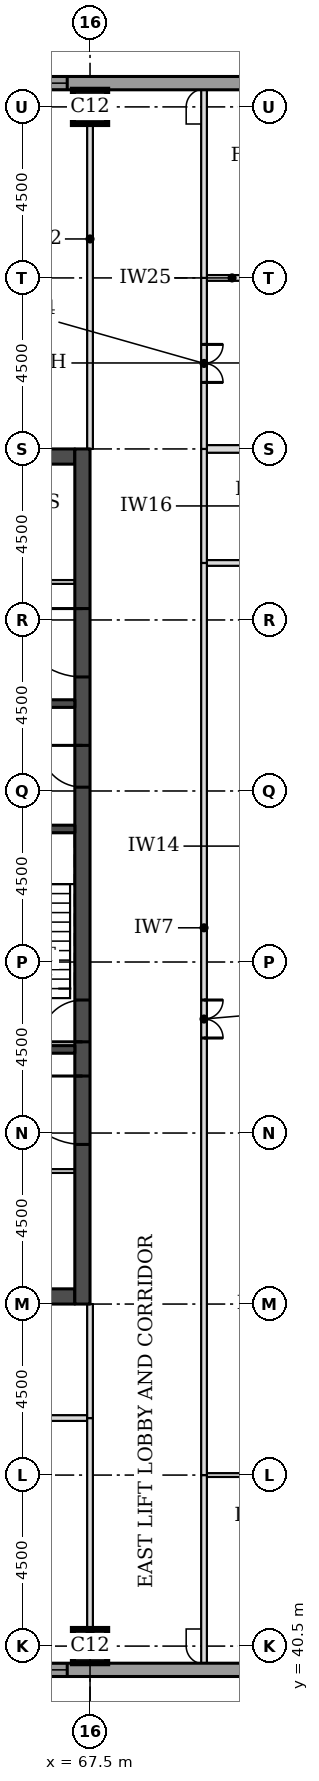
"""IFC4 building model, lengths in metres.
Left out: names, types, materials, properties, quantities, classifications, styles, units other than length and angle.
Written with IfcOpenShell. Run it as: python <this file> out.ifc"""

import sys

from ifc_helpers import new_model, si_unit, direction, frame, frame_2d, origin, origin_2d, place, context, subcontext, project, spatial, rectangle, extrude, element, fill, save


model = new_model("IFC4")
c1 = context("Model", 3, precision=1e-05, world=origin(), true_north=direction((0.0, 1.0)))
c2 = subcontext(c1, "Body", "Model", "MODEL_VIEW")
j1 = project(units=[si_unit("LENGTHUNIT", "METRE"), si_unit("PLANEANGLEUNIT", "RADIAN")], contexts=[c1])
p1 = place(None, origin())
s1 = spatial("IfcSite", under=j1, at=p1, CompositionType="ELEMENT")
p2 = place(p1, origin())
s2 = spatial("IfcBuilding", under=s1, at=p2, CompositionType="ELEMENT")
p3 = place(p2, frame((0.0, 0.0, 199.5)))
s3 = spatial("IfcBuildingStorey", under=s2, at=p3, CompositionType="ELEMENT", Elevation=199.5)
for number, where, z_axis, x_axis in (
    (1, (67.5, 40.5, 0.0), (0.0, 0.0, 1.0), (1.0, 0.0, 0.0)),
    (2, (67.5, 81.0, 0.0), (0.0, 0.0, 1.0), (1.0, 0.0, 0.0)),
):
    element("IfcColumn", number, at=place(p3, frame(where, z_axis=z_axis, x_axis=x_axis)), inside=s3, PredefinedType="COLUMN", context=c2, shape_type="SweptSolid", body=[
        extrude(rectangle(XDim=0.9, YDim=0.9, at=origin_2d()), origin(), (0.0, 0.0, 1.0), 3.7),
    ])
for number, where, z_axis, x_axis in (
    (3, (45.4, 49.7, 0.0), (0.0, 0.0, 1.0), (1.0, 0.0, 0.0)),
    (4, (45.4, 71.8, 0.0), (0.0, 0.0, 1.0), (1.0, 0.0, 0.0)),
):
    element("IfcWall", number, at=place(p3, frame(where, z_axis=z_axis, x_axis=x_axis)), inside=s3, PredefinedType="SHEAR", context=c2, shape_type="SweptSolid", body=[
        extrude(rectangle(XDim=21.7, YDim=0.4, at=frame_2d((10.85, 0.0))), origin(), (0.0, 0.0, 1.0), 3.7),
    ])
p4 = place(p3, frame((67.3, 49.5, 0.0), z_axis=(0.0, 0.0, 1.0), x_axis=(0.0, 1.0, 0.0)))
e5 = element("IfcWall", 5, at=p4, inside=s3, PredefinedType="SHEAR", context=c2, shape_type="SweptSolid", body=[
    extrude(rectangle(XDim=22.5, YDim=0.4, at=frame_2d((11.25, 0.0))), origin(), (0.0, 0.0, 1.0), 3.7),
])
p5 = place(p4, frame((4.2, 0.0, 0.0)))
e6 = element("IfcOpeningElement", 6, at=p5, cuts=e5, PredefinedType="OPENING", context=c2, shape_type="SweptSolid", body=[
    extrude(rectangle(XDim=1.8, YDim=2.1, at=frame_2d((0.9, 1.05))), frame((0.0, 0.21, 0.0), z_axis=(0.0, -1.0, 0.0), x_axis=(1.0, 0.0, 0.0)), (0.0, 0.0, 1.0), 0.42),
])
p6 = place(p4, frame((6.9, 0.0, 0.0)))
e7 = element("IfcOpeningElement", 7, at=p6, cuts=e5, PredefinedType="OPENING", context=c2, shape_type="SweptSolid", body=[
    extrude(rectangle(XDim=1.1, YDim=2.1, at=frame_2d((0.55, 1.05))), frame((0.0, 0.21, 0.0), z_axis=(0.0, -1.0, 0.0), x_axis=(1.0, 0.0, 0.0)), (0.0, 0.0, 1.0), 0.42),
])
p7 = place(p4, frame((13.6, 0.0, 0.0)))
e8 = element("IfcOpeningElement", 8, at=p7, cuts=e5, PredefinedType="OPENING", context=c2, shape_type="SweptSolid", body=[
    extrude(rectangle(XDim=1.1, YDim=2.1, at=frame_2d((0.55, 1.05))), frame((0.0, 0.21, 0.0), z_axis=(0.0, -1.0, 0.0), x_axis=(1.0, 0.0, 0.0)), (0.0, 0.0, 1.0), 0.42),
])
p8 = place(p4, frame((16.5, 0.0, 0.0)))
e9 = element("IfcOpeningElement", 9, at=p8, cuts=e5, PredefinedType="OPENING", context=c2, shape_type="SweptSolid", body=[
    extrude(rectangle(XDim=1.8, YDim=2.1, at=frame_2d((0.9, 1.05))), frame((0.0, 0.21, 0.0), z_axis=(0.0, -1.0, 0.0), x_axis=(1.0, 0.0, 0.0)), (0.0, 0.0, 1.0), 0.42),
])
p9 = place(p3, frame((36.0, 39.875, 0.0), z_axis=(0.0, 0.0, 1.0), x_axis=(1.0, 0.0, 0.0)))
e10 = element("IfcWall", 10, at=p9, inside=s3, PredefinedType="STANDARD", context=c2, shape_type="SweptSolid", body=[
    extrude(rectangle(XDim=36.331, YDim=0.35, at=frame_2d((18.166, 0.0))), origin(), (0.0, 0.0, 1.0), 3.525),
])
p10 = place(p9, frame((5.1, 0.0, 0.9)))
e11 = element("IfcOpeningElement", 11, at=p10, cuts=e10, PredefinedType="OPENING", context=c2, shape_type="SweptSolid", body=[
    extrude(rectangle(XDim=3.3, YDim=1.9, at=frame_2d((1.65, 0.95))), frame((0.0, 0.185, 0.0), z_axis=(0.0, -1.0, 0.0), x_axis=(1.0, 0.0, 0.0)), (0.0, 0.0, 1.0), 0.37),
])
p11 = place(p9, frame((9.6, 0.0, 0.9)))
e12 = element("IfcOpeningElement", 12, at=p11, cuts=e10, PredefinedType="OPENING", context=c2, shape_type="SweptSolid", body=[
    extrude(rectangle(XDim=3.3, YDim=1.9, at=frame_2d((1.65, 0.95))), frame((0.0, 0.185, 0.0), z_axis=(0.0, -1.0, 0.0), x_axis=(1.0, 0.0, 0.0)), (0.0, 0.0, 1.0), 0.37),
])
p12 = place(p9, frame((14.1, 0.0, 0.9)))
e13 = element("IfcOpeningElement", 13, at=p12, cuts=e10, PredefinedType="OPENING", context=c2, shape_type="SweptSolid", body=[
    extrude(rectangle(XDim=3.3, YDim=1.9, at=frame_2d((1.65, 0.95))), frame((0.0, 0.185, 0.0), z_axis=(0.0, -1.0, 0.0), x_axis=(1.0, 0.0, 0.0)), (0.0, 0.0, 1.0), 0.37),
])
p13 = place(p9, frame((18.6, 0.0, 0.9)))
e14 = element("IfcOpeningElement", 14, at=p13, cuts=e10, PredefinedType="OPENING", context=c2, shape_type="SweptSolid", body=[
    extrude(rectangle(XDim=3.3, YDim=1.9, at=frame_2d((1.65, 0.95))), frame((0.0, 0.185, 0.0), z_axis=(0.0, -1.0, 0.0), x_axis=(1.0, 0.0, 0.0)), (0.0, 0.0, 1.0), 0.37),
])
p14 = place(p9, frame((23.1, 0.0, 0.9)))
e15 = element("IfcOpeningElement", 15, at=p14, cuts=e10, PredefinedType="OPENING", context=c2, shape_type="SweptSolid", body=[
    extrude(rectangle(XDim=3.3, YDim=1.9, at=frame_2d((1.65, 0.95))), frame((0.0, 0.185, 0.0), z_axis=(0.0, -1.0, 0.0), x_axis=(1.0, 0.0, 0.0)), (0.0, 0.0, 1.0), 0.37),
])
p15 = place(p9, frame((27.6, 0.0, 0.9)))
e16 = element("IfcOpeningElement", 16, at=p15, cuts=e10, PredefinedType="OPENING", context=c2, shape_type="SweptSolid", body=[
    extrude(rectangle(XDim=3.3, YDim=1.9, at=frame_2d((1.65, 0.95))), frame((0.0, 0.185, 0.0), z_axis=(0.0, -1.0, 0.0), x_axis=(1.0, 0.0, 0.0)), (0.0, 0.0, 1.0), 0.37),
])
p16 = place(p3, frame((72.331, 81.625, 0.0), z_axis=(0.0, 0.0, 1.0), x_axis=(-1.0, 0.0, 0.0)))
e17 = element("IfcWall", 17, at=p16, inside=s3, PredefinedType="STANDARD", context=c2, shape_type="SweptSolid", body=[
    extrude(rectangle(XDim=32.163, YDim=0.35, at=frame_2d((16.081, 0.0))), origin(), (0.0, 0.0, 1.0), 3.525),
])
p17 = place(p16, frame((5.431, 0.0, 0.9)))
e18 = element("IfcOpeningElement", 18, at=p17, cuts=e17, PredefinedType="OPENING", context=c2, shape_type="SweptSolid", body=[
    extrude(rectangle(XDim=3.3, YDim=1.9, at=frame_2d((1.65, 0.95))), frame((0.0, 0.185, 0.0), z_axis=(0.0, -1.0, 0.0), x_axis=(1.0, 0.0, 0.0)), (0.0, 0.0, 1.0), 0.37),
])
p18 = place(p16, frame((9.931, 0.0, 0.9)))
e19 = element("IfcOpeningElement", 19, at=p18, cuts=e17, PredefinedType="OPENING", context=c2, shape_type="SweptSolid", body=[
    extrude(rectangle(XDim=3.3, YDim=1.9, at=frame_2d((1.65, 0.95))), frame((0.0, 0.185, 0.0), z_axis=(0.0, -1.0, 0.0), x_axis=(1.0, 0.0, 0.0)), (0.0, 0.0, 1.0), 0.37),
])
p19 = place(p16, frame((14.431, 0.0, 0.9)))
e20 = element("IfcOpeningElement", 20, at=p19, cuts=e17, PredefinedType="OPENING", context=c2, shape_type="SweptSolid", body=[
    extrude(rectangle(XDim=3.3, YDim=1.9, at=frame_2d((1.65, 0.95))), frame((0.0, 0.185, 0.0), z_axis=(0.0, -1.0, 0.0), x_axis=(1.0, 0.0, 0.0)), (0.0, 0.0, 1.0), 0.37),
])
p20 = place(p16, frame((18.931, 0.0, 0.9)))
e21 = element("IfcOpeningElement", 21, at=p20, cuts=e17, PredefinedType="OPENING", context=c2, shape_type="SweptSolid", body=[
    extrude(rectangle(XDim=3.3, YDim=1.9, at=frame_2d((1.65, 0.95))), frame((0.0, 0.185, 0.0), z_axis=(0.0, -1.0, 0.0), x_axis=(1.0, 0.0, 0.0)), (0.0, 0.0, 1.0), 0.37),
])
p21 = place(p16, frame((23.431, 0.0, 0.9)))
e22 = element("IfcOpeningElement", 22, at=p21, cuts=e17, PredefinedType="OPENING", context=c2, shape_type="SweptSolid", body=[
    extrude(rectangle(XDim=3.3, YDim=1.9, at=frame_2d((1.65, 0.95))), frame((0.0, 0.185, 0.0), z_axis=(0.0, -1.0, 0.0), x_axis=(1.0, 0.0, 0.0)), (0.0, 0.0, 1.0), 0.37),
])
p22 = place(p3, frame((70.575, 45.0, 0.0), z_axis=(0.0, 0.0, 1.0), x_axis=(1.0, 0.0, 0.0)))
e23 = element("IfcWall", 23, at=p22, inside=s3, PredefinedType="PARTITIONING", context=c2, shape_type="SweptSolid", body=[
    extrude(rectangle(XDim=2.925, YDim=0.1, at=frame_2d((1.462, 0.0))), origin(), (0.0, 0.0, 1.0), 3.096),
])
p23 = place(p22, frame((1.0, 0.0, 0.0)))
e24 = element("IfcOpeningElement", 24, at=p23, cuts=e23, PredefinedType="OPENING", context=c2, shape_type="SweptSolid", body=[
    extrude(rectangle(XDim=0.9, YDim=2.1, at=frame_2d((0.45, 1.05))), frame((0.0, 0.06, 0.0), z_axis=(0.0, -1.0, 0.0), x_axis=(1.0, 0.0, 0.0)), (0.0, 0.0, 1.0), 0.12),
])
p24 = place(p3, frame((63.0, 46.5, 0.0), z_axis=(0.0, 0.0, 1.0), x_axis=(1.0, 0.0, 0.0)))
e25 = element("IfcWall", 25, at=p24, inside=s3, PredefinedType="PARTITIONING", context=c2, shape_type="SweptSolid", body=[
    extrude(rectangle(XDim=4.425, YDim=0.15, at=frame_2d((2.212, 0.0))), origin(), (0.0, 0.0, 1.0), 3.55),
])
p25 = place(p24, frame((1.75, 0.0, 0.0)))
e26 = element("IfcOpeningElement", 26, at=p25, cuts=e25, PredefinedType="OPENING", context=c2, shape_type="SweptSolid", body=[
    extrude(rectangle(XDim=0.9, YDim=2.1, at=frame_2d((0.45, 1.05))), frame((0.0, 0.085, 0.0), z_axis=(0.0, -1.0, 0.0), x_axis=(1.0, 0.0, 0.0)), (0.0, 0.0, 1.0), 0.17),
])
p26 = place(p3, frame((70.575, 69.0, 0.0), z_axis=(0.0, 0.0, 1.0), x_axis=(1.0, 0.0, 0.0)))
e27 = element("IfcWall", 27, at=p26, inside=s3, PredefinedType="PARTITIONING", context=c2, shape_type="SweptSolid", body=[
    extrude(rectangle(XDim=2.85, YDim=0.15, at=frame_2d((1.425, 0.0))), origin(), (0.0, 0.0, 1.0), 3.55),
])
p27 = place(p26, frame((0.95, 0.0, 0.0)))
e28 = element("IfcOpeningElement", 28, at=p27, cuts=e27, PredefinedType="OPENING", context=c2, shape_type="SweptSolid", body=[
    extrude(rectangle(XDim=0.9, YDim=2.1, at=frame_2d((0.45, 1.05))), frame((0.0, 0.085, 0.0), z_axis=(0.0, -1.0, 0.0), x_axis=(1.0, 0.0, 0.0)), (0.0, 0.0, 1.0), 0.17),
])
p28 = place(p3, frame((70.575, 72.0, 0.0), z_axis=(0.0, 0.0, 1.0), x_axis=(1.0, 0.0, 0.0)))
e29 = element("IfcWall", 29, at=p28, inside=s3, PredefinedType="PARTITIONING", context=c2, shape_type="SweptSolid", body=[
    extrude(rectangle(XDim=2.85, YDim=0.2, at=frame_2d((1.425, 0.0))), origin(), (0.0, 0.0, 1.0), 3.55),
])
p29 = place(p3, frame((70.575, 76.5, 0.0), z_axis=(0.0, 0.0, 1.0), x_axis=(1.0, 0.0, 0.0)))
e30 = element("IfcWall", 30, at=p29, inside=s3, PredefinedType="PARTITIONING", context=c2, shape_type="SweptSolid", body=[
    extrude(rectangle(XDim=2.925, YDim=0.15, at=frame_2d((1.462, 0.0))), origin(), (0.0, 0.0, 1.0), 3.096),
])
p30 = place(p29, frame((1.0, 0.0, 0.0)))
e31 = element("IfcOpeningElement", 31, at=p30, cuts=e30, PredefinedType="OPENING", context=c2, shape_type="SweptSolid", body=[
    extrude(rectangle(XDim=0.9, YDim=2.1, at=frame_2d((0.45, 1.05))), frame((0.0, 0.085, 0.0), z_axis=(0.0, -1.0, 0.0), x_axis=(1.0, 0.0, 0.0)), (0.0, 0.0, 1.0), 0.17),
])
p31 = place(p3, frame((67.5, 40.05, 0.0), z_axis=(0.0, 0.0, 1.0), x_axis=(0.0, 1.0, 0.0)))
e32 = element("IfcWall", 32, at=p31, inside=s3, PredefinedType="PARTITIONING", context=c2, shape_type="SweptSolid", body=[
    extrude(rectangle(XDim=6.45, YDim=0.15, at=frame_2d((3.225, 0.0))), origin(), (0.0, 0.0, 1.0), 3.022),
])
p32 = place(p3, frame((70.5, 40.05, 0.0), z_axis=(0.0, 0.0, 1.0), x_axis=(0.0, 1.0, 0.0)))
e33 = element("IfcWall", 33, at=p32, inside=s3, PredefinedType="PARTITIONING", context=c2, shape_type="SweptSolid", body=[
    extrude(rectangle(XDim=4.95, YDim=0.15, at=frame_2d((2.475, 0.0))), origin(), (0.0, 0.0, 1.0), 3.55),
])
p33 = place(p3, frame((70.5, 45.0, 0.0), z_axis=(0.0, 0.0, 1.0), x_axis=(0.0, 1.0, 0.0)))
e34 = element("IfcWall", 34, at=p33, inside=s3, PredefinedType="PARTITIONING", context=c2, shape_type="SweptSolid", body=[
    extrude(rectangle(XDim=24.0, YDim=0.15, at=frame_2d((12.0, 0.0))), origin(), (0.0, 0.0, 1.0), 3.55),
])
p34 = place(p33, frame((11.5, 0.0, 0.0)))
e35 = element("IfcOpeningElement", 35, at=p34, cuts=e34, PredefinedType="OPENING", context=c2, shape_type="SweptSolid", body=[
    extrude(rectangle(XDim=1.0, YDim=2.1, at=frame_2d((0.5, 1.05))), frame((0.0, 0.085, 0.0), z_axis=(0.0, -1.0, 0.0), x_axis=(1.0, 0.0, 0.0)), (0.0, 0.0, 1.0), 0.17),
])
p35 = place(p3, frame((67.5, 46.5, 0.0), z_axis=(0.0, 0.0, 1.0), x_axis=(0.0, 1.0, 0.0)))
e36 = element("IfcWall", 36, at=p35, inside=s3, PredefinedType="PARTITIONING", context=c2, shape_type="SweptSolid", body=[
    extrude(rectangle(XDim=3.0, YDim=0.15, at=frame_2d((1.5, 0.0))), origin(), (0.0, 0.0, 1.0), 3.022),
])
p36 = place(p3, frame((70.5, 69.0, 0.0), z_axis=(0.0, 0.0, 1.0), x_axis=(0.0, 1.0, 0.0)))
e37 = element("IfcWall", 37, at=p36, inside=s3, PredefinedType="PARTITIONING", context=c2, shape_type="SweptSolid", body=[
    extrude(rectangle(XDim=3.0, YDim=0.15, at=frame_2d((1.5, 0.0))), origin(), (0.0, 0.0, 1.0), 3.55),
])
p37 = place(p3, frame((67.5, 72.0, 0.0), z_axis=(0.0, 0.0, 1.0), x_axis=(0.0, 1.0, 0.0)))
e38 = element("IfcWall", 38, at=p37, inside=s3, PredefinedType="PARTITIONING", context=c2, shape_type="SweptSolid", body=[
    extrude(rectangle(XDim=9.45, YDim=0.15, at=frame_2d((4.725, 0.0))), origin(), (0.0, 0.0, 1.0), 3.022),
])
p38 = place(p3, frame((70.5, 72.0, 0.0), z_axis=(0.0, 0.0, 1.0), x_axis=(0.0, 1.0, 0.0)))
e39 = element("IfcWall", 39, at=p38, inside=s3, PredefinedType="PARTITIONING", context=c2, shape_type="SweptSolid", body=[
    extrude(rectangle(XDim=4.5, YDim=0.15, at=frame_2d((2.25, 0.0))), origin(), (0.0, 0.0, 1.0), 3.55),
])
p39 = place(p38, frame((1.75, 0.0, 0.0)))
e40 = element("IfcOpeningElement", 40, at=p39, cuts=e39, PredefinedType="OPENING", context=c2, shape_type="SweptSolid", body=[
    extrude(rectangle(XDim=1.0, YDim=2.1, at=frame_2d((0.5, 1.05))), frame((0.0, 0.085, 0.0), z_axis=(0.0, -1.0, 0.0), x_axis=(1.0, 0.0, 0.0)), (0.0, 0.0, 1.0), 0.17),
])
p40 = place(p3, frame((70.5, 76.5, 0.0), z_axis=(0.0, 0.0, 1.0), x_axis=(0.0, 1.0, 0.0)))
e41 = element("IfcWall", 41, at=p40, inside=s3, PredefinedType="PARTITIONING", context=c2, shape_type="SweptSolid", body=[
    extrude(rectangle(XDim=4.95, YDim=0.15, at=frame_2d((2.475, 0.0))), origin(), (0.0, 0.0, 1.0), 3.55),
])
p41 = place(p3, frame((45.4, 53.0, 0.0), z_axis=(0.0, 0.0, 1.0), x_axis=(1.0, 0.0, 0.0)))
e42 = element("IfcWall", 42, at=p41, inside=s3, PredefinedType="PARTITIONING", context=c2, shape_type="SweptSolid", body=[
    extrude(rectangle(XDim=21.7, YDim=0.1, at=frame_2d((10.85, 0.0))), origin(), (0.0, 0.0, 1.0), 3.55),
])
p42 = place(p41, frame((20.019, 0.0, 0.0)))
e43 = element("IfcOpeningElement", 43, at=p42, cuts=e42, PredefinedType="OPENING", context=c2, shape_type="SweptSolid", body=[
    extrude(rectangle(XDim=1.0, YDim=2.1, at=frame_2d((0.5, 1.05))), frame((0.0, 0.06, 0.0), z_axis=(0.0, -1.0, 0.0), x_axis=(1.0, 0.0, 0.0)), (0.0, 0.0, 1.0), 0.12),
])
p43 = place(p41, frame((17.444, 0.0, 0.0)))
e44 = element("IfcOpeningElement", 44, at=p43, cuts=e42, PredefinedType="OPENING", context=c2, shape_type="SweptSolid", body=[
    extrude(rectangle(XDim=0.9, YDim=2.1, at=frame_2d((0.45, 1.05))), frame((0.0, 0.06, 0.0), z_axis=(0.0, -1.0, 0.0), x_axis=(1.0, 0.0, 0.0)), (0.0, 0.0, 1.0), 0.12),
])
p44 = place(p41, frame((0.863, 0.0, 0.0)))
e45 = element("IfcOpeningElement", 45, at=p44, cuts=e42, PredefinedType="OPENING", context=c2, shape_type="SweptSolid", body=[
    extrude(rectangle(XDim=0.9, YDim=2.1, at=frame_2d((0.45, 1.05))), frame((0.0, 0.06, 0.0), z_axis=(0.0, -1.0, 0.0), x_axis=(1.0, 0.0, 0.0)), (0.0, 0.0, 1.0), 0.12),
])
p45 = place(p41, frame((3.488, 0.0, 0.0)))
e46 = element("IfcOpeningElement", 46, at=p45, cuts=e42, PredefinedType="OPENING", context=c2, shape_type="SweptSolid", body=[
    extrude(rectangle(XDim=0.9, YDim=2.1, at=frame_2d((0.45, 1.05))), frame((0.0, 0.06, 0.0), z_axis=(0.0, -1.0, 0.0), x_axis=(1.0, 0.0, 0.0)), (0.0, 0.0, 1.0), 0.12),
])
p46 = place(p41, frame((6.816, 0.0, 0.0)))
e47 = element("IfcOpeningElement", 47, at=p46, cuts=e42, PredefinedType="OPENING", context=c2, shape_type="SweptSolid", body=[
    extrude(rectangle(XDim=0.9, YDim=2.1, at=frame_2d((0.45, 1.05))), frame((0.0, 0.06, 0.0), z_axis=(0.0, -1.0, 0.0), x_axis=(1.0, 0.0, 0.0)), (0.0, 0.0, 1.0), 0.12),
])
p47 = place(p41, frame((12.416, 0.0, 0.0)))
e48 = element("IfcOpeningElement", 48, at=p47, cuts=e42, PredefinedType="OPENING", context=c2, shape_type="SweptSolid", body=[
    extrude(rectangle(XDim=0.9, YDim=2.1, at=frame_2d((0.45, 1.05))), frame((0.0, 0.06, 0.0), z_axis=(0.0, -1.0, 0.0), x_axis=(1.0, 0.0, 0.0)), (0.0, 0.0, 1.0), 0.12),
])
p48 = place(p3, frame((63.9, 56.2, 0.0), z_axis=(0.0, 0.0, 1.0), x_axis=(1.0, 0.0, 0.0)))
e49 = element("IfcWall", 49, at=p48, inside=s3, PredefinedType="SOLIDWALL", context=c2, shape_type="SweptSolid", body=[
    extrude(rectangle(XDim=3.2, YDim=0.2, at=frame_2d((1.6, 0.0))), origin(), (0.0, 0.0, 1.0), 3.55),
])
p49 = place(p3, frame((61.85, 62.0, 0.0), z_axis=(0.0, 0.0, 1.0), x_axis=(1.0, 0.0, 0.0)))
e50 = element("IfcWall", 50, at=p49, inside=s3, PredefinedType="SOLIDWALL", context=c2, shape_type="SweptSolid", body=[
    extrude(rectangle(XDim=5.25, YDim=0.2, at=frame_2d((2.625, 0.0))), origin(), (0.0, 0.0, 1.0), 3.55),
])
p50 = place(p3, frame((64.7, 65.3, 0.0), z_axis=(0.0, 0.0, 1.0), x_axis=(1.0, 0.0, 0.0)))
e51 = element("IfcWall", 51, at=p50, inside=s3, PredefinedType="SOLIDWALL", context=c2, shape_type="SweptSolid", body=[
    extrude(rectangle(XDim=2.4, YDim=0.2, at=frame_2d((1.2, 0.0))), origin(), (0.0, 0.0, 1.0), 3.55),
])
p51 = place(p3, frame((45.4, 68.5, 0.0), z_axis=(0.0, 0.0, 1.0), x_axis=(1.0, 0.0, 0.0)))
e52 = element("IfcWall", 52, at=p51, inside=s3, PredefinedType="PARTITIONING", context=c2, shape_type="SweptSolid", body=[
    extrude(rectangle(XDim=21.7, YDim=0.1, at=frame_2d((10.85, 0.0))), origin(), (0.0, 0.0, 1.0), 3.55),
])
p52 = place(p51, frame((19.806, 0.0, 0.0)))
e53 = element("IfcOpeningElement", 53, at=p52, cuts=e52, PredefinedType="OPENING", context=c2, shape_type="SweptSolid", body=[
    extrude(rectangle(XDim=0.9, YDim=2.1, at=frame_2d((0.45, 1.05))), frame((0.0, 0.06, 0.0), z_axis=(0.0, -1.0, 0.0), x_axis=(1.0, 0.0, 0.0)), (0.0, 0.0, 1.0), 0.12),
])
p53 = place(p51, frame((17.181, 0.0, 0.0)))
e54 = element("IfcOpeningElement", 54, at=p53, cuts=e52, PredefinedType="OPENING", context=c2, shape_type="SweptSolid", body=[
    extrude(rectangle(XDim=0.9, YDim=2.1, at=frame_2d((0.45, 1.05))), frame((0.0, 0.06, 0.0), z_axis=(0.0, -1.0, 0.0), x_axis=(1.0, 0.0, 0.0)), (0.0, 0.0, 1.0), 0.12),
])
p54 = place(p51, frame((2.175, 0.0, 0.0)))
e55 = element("IfcOpeningElement", 55, at=p54, cuts=e52, PredefinedType="OPENING", context=c2, shape_type="SweptSolid", body=[
    extrude(rectangle(XDim=0.9, YDim=2.1, at=frame_2d((0.45, 1.05))), frame((0.0, 0.06, 0.0), z_axis=(0.0, -1.0, 0.0), x_axis=(1.0, 0.0, 0.0)), (0.0, 0.0, 1.0), 0.12),
])
p55 = place(p51, frame((13.984, 0.0, 0.0)))
e56 = element("IfcOpeningElement", 56, at=p55, cuts=e52, PredefinedType="OPENING", context=c2, shape_type="SweptSolid", body=[
    extrude(rectangle(XDim=0.9, YDim=2.1, at=frame_2d((0.45, 1.05))), frame((0.0, 0.06, 0.0), z_axis=(0.0, -1.0, 0.0), x_axis=(1.0, 0.0, 0.0)), (0.0, 0.0, 1.0), 0.12),
])
p56 = place(p51, frame((8.384, 0.0, 0.0)))
e57 = element("IfcOpeningElement", 57, at=p56, cuts=e52, PredefinedType="OPENING", context=c2, shape_type="SweptSolid", body=[
    extrude(rectangle(XDim=0.9, YDim=2.1, at=frame_2d((0.45, 1.05))), frame((0.0, 0.06, 0.0), z_axis=(0.0, -1.0, 0.0), x_axis=(1.0, 0.0, 0.0)), (0.0, 0.0, 1.0), 0.12),
])
p57 = place(p15, origin())
e58 = element("IfcWindow", 58, at=p57, inside=s3, PartitioningType="SINGLE_PANEL", PredefinedType="WINDOW", context=c2, shape_type="SweptSolid", body=[
    extrude(rectangle(XDim=3.3, YDim=1.9, at=frame_2d((1.65, 0.95))), frame((0.0, 0.085, 0.0), z_axis=(0.0, -1.0, 0.0), x_axis=(1.0, 0.0, 0.0)), (0.0, 0.0, 1.0), 0.06),
])
fill(e16, e58)
p58 = place(p17, origin())
e59 = element("IfcWindow", 59, at=p58, inside=s3, PartitioningType="SINGLE_PANEL", PredefinedType="WINDOW", context=c2, shape_type="SweptSolid", body=[
    extrude(rectangle(XDim=3.3, YDim=1.9, at=frame_2d((1.65, 0.95))), frame((0.0, 0.085, 0.0), z_axis=(0.0, -1.0, 0.0), x_axis=(1.0, 0.0, 0.0)), (0.0, 0.0, 1.0), 0.06),
])
fill(e18, e59)
p59 = place(p34, frame((1.0, 0.0, 0.0), z_axis=(0.0, 0.0, 1.0), x_axis=(-1.0, 0.0, 0.0)))
e60 = element("IfcDoor", 60, at=p59, inside=s3, OperationType="DOUBLE_DOOR_SINGLE_SWING", PredefinedType="DOOR", context=c2, shape_type="SweptSolid", body=[
    extrude(rectangle(XDim=1.0, YDim=2.1, at=frame_2d((0.5, 1.05))), frame((0.0, 0.025, 0.0), z_axis=(0.0, -1.0, 0.0), x_axis=(1.0, 0.0, 0.0)), (0.0, 0.0, 1.0), 0.05),
])
fill(e35, e60)
p60 = place(p39, frame((1.0, 0.0, 0.0), z_axis=(0.0, 0.0, 1.0), x_axis=(-1.0, 0.0, 0.0)))
e61 = element("IfcDoor", 61, at=p60, inside=s3, OperationType="DOUBLE_DOOR_SINGLE_SWING", PredefinedType="DOOR", context=c2, shape_type="SweptSolid", body=[
    extrude(rectangle(XDim=1.0, YDim=2.1, at=frame_2d((0.5, 1.05))), frame((0.0, 0.025, 0.0), z_axis=(0.0, -1.0, 0.0), x_axis=(1.0, 0.0, 0.0)), (0.0, 0.0, 1.0), 0.05),
])
fill(e40, e61)
p61 = place(p5, origin())
e62 = element("IfcDoor", 62, at=p61, inside=s3, OperationType="SINGLE_SWING_RIGHT", PredefinedType="DOOR", context=c2, shape_type="SweptSolid", body=[
    extrude(rectangle(XDim=1.8, YDim=2.1, at=frame_2d((0.9, 1.05))), frame((0.0, 0.025, 0.0), z_axis=(0.0, -1.0, 0.0), x_axis=(1.0, 0.0, 0.0)), (0.0, 0.0, 1.0), 0.05),
])
fill(e6, e62)
p62 = place(p6, origin())
e63 = element("IfcDoor", 63, at=p62, inside=s3, OperationType="SINGLE_SWING_LEFT", PredefinedType="DOOR", context=c2, shape_type="SweptSolid", body=[
    extrude(rectangle(XDim=1.1, YDim=2.1, at=frame_2d((0.55, 1.05))), frame((0.0, 0.025, 0.0), z_axis=(0.0, -1.0, 0.0), x_axis=(1.0, 0.0, 0.0)), (0.0, 0.0, 1.0), 0.05),
])
fill(e7, e63)
p63 = place(p7, origin())
e64 = element("IfcDoor", 64, at=p63, inside=s3, OperationType="SINGLE_SWING_RIGHT", PredefinedType="DOOR", context=c2, shape_type="SweptSolid", body=[
    extrude(rectangle(XDim=1.1, YDim=2.1, at=frame_2d((0.55, 1.05))), frame((0.0, 0.025, 0.0), z_axis=(0.0, -1.0, 0.0), x_axis=(1.0, 0.0, 0.0)), (0.0, 0.0, 1.0), 0.05),
])
fill(e8, e64)
p64 = place(p8, origin())
e65 = element("IfcDoor", 65, at=p64, inside=s3, OperationType="SINGLE_SWING_RIGHT", PredefinedType="DOOR", context=c2, shape_type="SweptSolid", body=[
    extrude(rectangle(XDim=1.8, YDim=2.1, at=frame_2d((0.9, 1.05))), frame((0.0, 0.025, 0.0), z_axis=(0.0, -1.0, 0.0), x_axis=(1.0, 0.0, 0.0)), (0.0, 0.0, 1.0), 0.05),
])
fill(e9, e65)
save(model, sys.argv[1])
